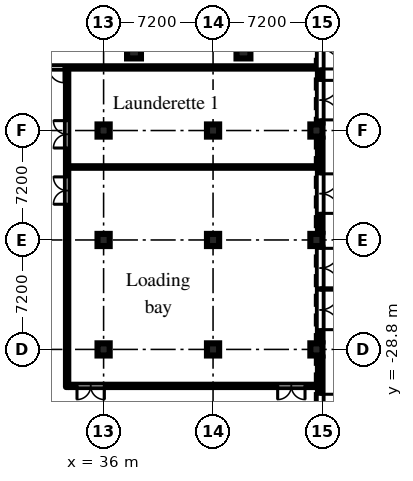
"""IFC4 building model, lengths in metres.
Left out: names, types, materials, properties, quantities, classifications, styles, units other than length and angle.
Written with IfcOpenShell. Run it as: python <this file> out.ifc"""

import sys

from ifc_helpers import new_model, si_unit, direction, frame, frame_2d, origin, origin_2d, place, context, subcontext, project, spatial, rectangle, hollow_circle, extrude, element, fill, save


model = new_model("IFC4")
c1 = context("Model", 3, precision=1e-05, world=origin(), true_north=direction((0.0, 1.0)))
c2 = subcontext(c1, "Body", "Model", "MODEL_VIEW")
j1 = project(units=[si_unit("LENGTHUNIT", "METRE"), si_unit("PLANEANGLEUNIT", "RADIAN")], contexts=[c1])
p1 = place(None, origin())
s1 = spatial("IfcSite", under=j1, at=p1, CompositionType="ELEMENT")
p2 = place(p1, origin())
s2 = spatial("IfcBuilding", under=s1, at=p2, CompositionType="ELEMENT")
p3 = place(p2, origin())
s3 = spatial("IfcBuildingStorey", under=s2, at=p3, CompositionType="ELEMENT", Elevation=0.0)
for number, where, z_axis, x_axis in (
    (1, (36.0, -28.8, 0.0), (0.0, 0.0, 1.0), (1.0, 0.0, 0.0)),
    (2, (36.0, -21.6, 0.0), (0.0, 0.0, 1.0), (1.0, 0.0, 0.0)),
    (3, (36.0, -14.4, 0.0), (0.0, 0.0, 1.0), (1.0, 0.0, 0.0)),
    (4, (43.2, -28.8, 0.0), (0.0, 0.0, 1.0), (1.0, 0.0, 0.0)),
    (5, (43.2, -21.6, 0.0), (0.0, 0.0, 1.0), (1.0, 0.0, 0.0)),
    (6, (43.2, -14.4, 0.0), (0.0, 0.0, 1.0), (1.0, 0.0, 0.0)),
    (7, (50.0, -28.8, 0.0), (0.0, 0.0, 1.0), (1.0, 0.0, 0.0)),
    (8, (50.0, -21.6, 0.0), (0.0, 0.0, 1.0), (1.0, 0.0, 0.0)),
    (9, (50.0, -14.4, 0.0), (0.0, 0.0, 1.0), (1.0, 0.0, 0.0)),
):
    element("IfcColumn", number, at=place(p3, frame(where, z_axis=z_axis, x_axis=x_axis)), inside=s3, PredefinedType="COLUMN", context=c2, shape_type="SweptSolid", body=[
        extrude(rectangle(XDim=0.8, YDim=0.8, at=origin_2d()), origin(), (0.0, 0.0, 1.0), 6.6),
    ])
for number, where, z_axis, x_axis in (
    (10, (38.0, -9.2, 0.0), (0.0, 0.0, 1.0), (1.0, 0.0, 0.0)),
    (11, (45.2, -9.2, 0.0), (0.0, 0.0, 1.0), (1.0, 0.0, 0.0)),
):
    element("IfcColumn", number, at=place(p3, frame(where, z_axis=z_axis, x_axis=x_axis)), inside=s3, PredefinedType="COLUMN", context=c2, shape_type="SweptSolid", body=[
        extrude(hollow_circle(Radius=0.457, WallThickness=0.05, at=origin_2d()), origin(), (0.0, 0.0, 1.0), 7.5),
    ])
p4 = place(p3, frame((50.25, -35.6, 0.0), z_axis=(0.0, 0.0, 1.0), x_axis=(0.0, 1.0, 0.0)))
e12 = element("IfcWall", 12, at=p4, inside=s3, PredefinedType="SOLIDWALL", context=c2, shape_type="SweptSolid", body=[
    extrude(rectangle(XDim=6.4, YDim=0.3, at=frame_2d((3.2, 0.0))), origin(), (0.0, 0.0, 1.0), 6.6),
])
p5 = place(p4, frame((2.55, 0.0, 0.0)))
e13 = element("IfcOpeningElement", 13, at=p5, cuts=e12, PredefinedType="OPENING", context=c2, shape_type="SweptSolid", body=[
    extrude(rectangle(XDim=1.3, YDim=2.1, at=frame_2d((0.65, 1.05))), frame((0.0, 0.16, 0.0), z_axis=(0.0, -1.0, 0.0), x_axis=(1.0, 0.0, 0.0)), (0.0, 0.0, 1.0), 0.32),
])
p6 = place(p3, frame((50.25, -28.4, 0.0), z_axis=(0.0, 0.0, 1.0), x_axis=(0.0, 1.0, 0.0)))
e14 = element("IfcWall", 14, at=p6, inside=s3, PredefinedType="SOLIDWALL", context=c2, shape_type="SweptSolid", body=[
    extrude(rectangle(XDim=6.4, YDim=0.3, at=frame_2d((3.2, 0.0))), origin(), (0.0, 0.0, 1.0), 6.6),
])
p7 = place(p6, frame((0.9, 0.0, 0.0)))
e15 = element("IfcOpeningElement", 15, at=p7, cuts=e14, PredefinedType="OPENING", context=c2, shape_type="SweptSolid", body=[
    extrude(rectangle(XDim=2.6, YDim=2.4, at=frame_2d((1.3, 1.2))), frame((0.0, 0.16, 0.0), z_axis=(0.0, -1.0, 0.0), x_axis=(1.0, 0.0, 0.0)), (0.0, 0.0, 1.0), 0.32),
])
p8 = place(p6, frame((3.65, 0.0, 0.0)))
e16 = element("IfcOpeningElement", 16, at=p8, cuts=e14, PredefinedType="OPENING", context=c2, shape_type="SweptSolid", body=[
    extrude(rectangle(XDim=2.6, YDim=2.4, at=frame_2d((1.3, 1.2))), frame((0.0, 0.16, 0.0), z_axis=(0.0, -1.0, 0.0), x_axis=(1.0, 0.0, 0.0)), (0.0, 0.0, 1.0), 0.32),
])
p9 = place(p3, frame((50.25, -21.2, 0.0), z_axis=(0.0, 0.0, 1.0), x_axis=(0.0, 1.0, 0.0)))
e17 = element("IfcWall", 17, at=p9, inside=s3, PredefinedType="SOLIDWALL", context=c2, shape_type="SweptSolid", body=[
    extrude(rectangle(XDim=6.4, YDim=0.3, at=frame_2d((3.2, 0.0))), origin(), (0.0, 0.0, 1.0), 6.6),
])
p10 = place(p9, frame((1.35, 0.0, 0.0)))
e18 = element("IfcOpeningElement", 18, at=p10, cuts=e17, PredefinedType="OPENING", context=c2, shape_type="SweptSolid", body=[
    extrude(rectangle(XDim=2.6, YDim=2.4, at=frame_2d((1.3, 1.2))), frame((0.0, 0.16, 0.0), z_axis=(0.0, -1.0, 0.0), x_axis=(1.0, 0.0, 0.0)), (0.0, 0.0, 1.0), 0.32),
])
p11 = place(p3, frame((50.25, -14.0, 0.0), z_axis=(0.0, 0.0, 1.0), x_axis=(0.0, 1.0, 0.0)))
e19 = element("IfcWall", 19, at=p11, inside=s3, PredefinedType="SOLIDWALL", context=c2, shape_type="SweptSolid", body=[
    extrude(rectangle(XDim=6.4, YDim=0.3, at=frame_2d((3.2, 0.0))), origin(), (0.0, 0.0, 1.0), 6.6),
])
p12 = place(p11, frame((0.3, 0.0, 0.0)))
e20 = element("IfcOpeningElement", 20, at=p12, cuts=e19, PredefinedType="OPENING", context=c2, shape_type="SweptSolid", body=[
    extrude(rectangle(XDim=2.6, YDim=2.4, at=frame_2d((1.3, 1.2))), frame((0.0, 0.16, 0.0), z_axis=(0.0, -1.0, 0.0), x_axis=(1.0, 0.0, 0.0)), (0.0, 0.0, 1.0), 0.32),
])
p13 = place(p11, frame((3.65, 0.0, 0.0)))
e21 = element("IfcOpeningElement", 21, at=p13, cuts=e19, PredefinedType="OPENING", context=c2, shape_type="SweptSolid", body=[
    extrude(rectangle(XDim=2.6, YDim=2.4, at=frame_2d((1.3, 1.2))), frame((0.0, 0.16, 0.0), z_axis=(0.0, -1.0, 0.0), x_axis=(1.0, 0.0, 0.0)), (0.0, 0.0, 1.0), 0.32),
])
p14 = place(p3, frame((12.675, -10.25, 0.0), z_axis=(0.0, 0.0, 1.0), x_axis=(1.0, 0.0, 0.0)))
e22 = element("IfcWall", 22, at=p14, inside=s3, PredefinedType="PARTITIONING", context=c2, shape_type="SweptSolid", body=[
    extrude(rectangle(XDim=37.545, YDim=0.15, at=frame_2d((18.772, 0.0))), origin(), (0.0, 0.0, 1.0), 6.6),
])
p15 = place(p14, frame((4.225, 0.0, 0.0)))
e23 = element("IfcOpeningElement", 23, at=p15, cuts=e22, PredefinedType="OPENING", context=c2, shape_type="SweptSolid", body=[
    extrude(rectangle(XDim=1.2, YDim=2.1, at=frame_2d((0.6, 1.05))), frame((0.0, 0.085, 0.0), z_axis=(0.0, -1.0, 0.0), x_axis=(1.0, 0.0, 0.0)), (0.0, 0.0, 1.0), 0.17),
])
p16 = place(p14, frame((18.725, 0.0, 0.0)))
e24 = element("IfcOpeningElement", 24, at=p16, cuts=e22, PredefinedType="OPENING", context=c2, shape_type="SweptSolid", body=[
    extrude(rectangle(XDim=2.0, YDim=2.1, at=frame_2d((1.0, 1.05))), frame((0.0, 0.085, 0.0), z_axis=(0.0, -1.0, 0.0), x_axis=(1.0, 0.0, 0.0)), (0.0, 0.0, 1.0), 0.17),
])
p17 = place(p3, frame((33.6, -31.275, 0.0), z_axis=(0.0, 0.0, 1.0), x_axis=(0.0, 1.0, 0.0)))
e25 = element("IfcWall", 25, at=p17, inside=s3, PredefinedType="PARTITIONING", context=c2, shape_type="SweptSolid", body=[
    extrude(rectangle(XDim=20.95, YDim=0.15, at=frame_2d((10.475, 0.0))), origin(), (0.0, 0.0, 1.0), 6.6),
])
p18 = place(p17, frame((15.725, 0.0, 0.0)))
e26 = element("IfcOpeningElement", 26, at=p18, cuts=e25, PredefinedType="OPENING", context=c2, shape_type="SweptSolid", body=[
    extrude(rectangle(XDim=1.8, YDim=2.1, at=frame_2d((0.9, 1.05))), frame((0.0, 0.085, 0.0), z_axis=(0.0, -1.0, 0.0), x_axis=(1.0, 0.0, 0.0)), (0.0, 0.0, 1.0), 0.17),
])
p19 = place(p17, frame((12.025, 0.0, 0.0)))
e27 = element("IfcOpeningElement", 27, at=p19, cuts=e25, PredefinedType="OPENING", context=c2, shape_type="SweptSolid", body=[
    extrude(rectangle(XDim=1.8, YDim=2.1, at=frame_2d((0.9, 1.05))), frame((0.0, 0.085, 0.0), z_axis=(0.0, -1.0, 0.0), x_axis=(1.0, 0.0, 0.0)), (0.0, 0.0, 1.0), 0.17),
])
p20 = place(p3, frame((33.675, -31.2, 0.0), z_axis=(0.0, 0.0, 1.0), x_axis=(1.0, 0.0, 0.0)))
e28 = element("IfcWall", 28, at=p20, inside=s3, PredefinedType="PARTITIONING", context=c2, shape_type="SweptSolid", body=[
    extrude(rectangle(XDim=16.545, YDim=0.15, at=frame_2d((8.272, 0.0))), origin(), (0.0, 0.0, 1.0), 6.6),
])
p21 = place(p20, frame((0.575, 0.0, 0.0)))
e29 = element("IfcOpeningElement", 29, at=p21, cuts=e28, PredefinedType="OPENING", context=c2, shape_type="SweptSolid", body=[
    extrude(rectangle(XDim=1.8, YDim=2.1, at=frame_2d((0.9, 1.05))), frame((0.0, 0.085, 0.0), z_axis=(0.0, -1.0, 0.0), x_axis=(1.0, 0.0, 0.0)), (0.0, 0.0, 1.0), 0.17),
])
p22 = place(p20, frame((13.775, 0.0, 0.0)))
e30 = element("IfcOpeningElement", 30, at=p22, cuts=e28, PredefinedType="OPENING", context=c2, shape_type="SweptSolid", body=[
    extrude(rectangle(XDim=1.8, YDim=2.1, at=frame_2d((0.9, 1.05))), frame((0.0, 0.085, 0.0), z_axis=(0.0, -1.0, 0.0), x_axis=(1.0, 0.0, 0.0)), (0.0, 0.0, 1.0), 0.17),
])
p23 = place(p3, frame((33.675, -16.8, 0.0), z_axis=(0.0, 0.0, 1.0), x_axis=(1.0, 0.0, 0.0)))
e31 = element("IfcWall", 31, at=p23, inside=s3, PredefinedType="PARTITIONING", context=c2, shape_type="SweptSolid", body=[
    extrude(rectangle(XDim=16.545, YDim=0.1, at=frame_2d((8.272, 0.0))), origin(), (0.0, 0.0, 1.0), 6.6),
])
p24 = place(p5, frame((1.3, 0.0, 0.0), z_axis=(0.0, 0.0, 1.0), x_axis=(-1.0, 0.0, 0.0)))
e32 = element("IfcDoor", 32, at=p24, inside=s3, OperationType="SINGLE_SWING_LEFT", PredefinedType="DOOR", context=c2, shape_type="SweptSolid", body=[
    extrude(rectangle(XDim=1.3, YDim=2.1, at=frame_2d((0.65, 1.05))), frame((0.0, 0.025, 0.0), z_axis=(0.0, -1.0, 0.0), x_axis=(1.0, 0.0, 0.0)), (0.0, 0.0, 1.0), 0.05),
])
fill(e13, e32)
p25 = place(p7, frame((2.6, 0.0, 0.0), z_axis=(0.0, 0.0, 1.0), x_axis=(-1.0, 0.0, 0.0)))
e33 = element("IfcDoor", 33, at=p25, inside=s3, OperationType="DOUBLE_DOOR_DOUBLE_SWING", PredefinedType="DOOR", context=c2, shape_type="SweptSolid", body=[
    extrude(rectangle(XDim=2.6, YDim=2.4, at=frame_2d((1.3, 1.2))), frame((0.0, 0.025, 0.0), z_axis=(0.0, -1.0, 0.0), x_axis=(1.0, 0.0, 0.0)), (0.0, 0.0, 1.0), 0.05),
])
fill(e15, e33)
p26 = place(p8, frame((2.6, 0.0, 0.0), z_axis=(0.0, 0.0, 1.0), x_axis=(-1.0, 0.0, 0.0)))
e34 = element("IfcDoor", 34, at=p26, inside=s3, OperationType="DOUBLE_DOOR_DOUBLE_SWING", PredefinedType="DOOR", context=c2, shape_type="SweptSolid", body=[
    extrude(rectangle(XDim=2.6, YDim=2.4, at=frame_2d((1.3, 1.2))), frame((0.0, 0.025, 0.0), z_axis=(0.0, -1.0, 0.0), x_axis=(1.0, 0.0, 0.0)), (0.0, 0.0, 1.0), 0.05),
])
fill(e16, e34)
p27 = place(p10, frame((2.6, 0.0, 0.0), z_axis=(0.0, 0.0, 1.0), x_axis=(-1.0, 0.0, 0.0)))
e35 = element("IfcDoor", 35, at=p27, inside=s3, OperationType="DOUBLE_DOOR_DOUBLE_SWING", PredefinedType="DOOR", context=c2, shape_type="SweptSolid", body=[
    extrude(rectangle(XDim=2.6, YDim=2.4, at=frame_2d((1.3, 1.2))), frame((0.0, 0.025, 0.0), z_axis=(0.0, -1.0, 0.0), x_axis=(1.0, 0.0, 0.0)), (0.0, 0.0, 1.0), 0.05),
])
fill(e18, e35)
p28 = place(p12, frame((2.6, 0.0, 0.0), z_axis=(0.0, 0.0, 1.0), x_axis=(-1.0, 0.0, 0.0)))
e36 = element("IfcDoor", 36, at=p28, inside=s3, OperationType="DOUBLE_DOOR_DOUBLE_SWING", PredefinedType="DOOR", context=c2, shape_type="SweptSolid", body=[
    extrude(rectangle(XDim=2.6, YDim=2.4, at=frame_2d((1.3, 1.2))), frame((0.0, 0.025, 0.0), z_axis=(0.0, -1.0, 0.0), x_axis=(1.0, 0.0, 0.0)), (0.0, 0.0, 1.0), 0.05),
])
fill(e20, e36)
p29 = place(p13, frame((2.6, 0.0, 0.0), z_axis=(0.0, 0.0, 1.0), x_axis=(-1.0, 0.0, 0.0)))
e37 = element("IfcDoor", 37, at=p29, inside=s3, OperationType="DOUBLE_DOOR_DOUBLE_SWING", PredefinedType="DOOR", context=c2, shape_type="SweptSolid", body=[
    extrude(rectangle(XDim=2.6, YDim=2.4, at=frame_2d((1.3, 1.2))), frame((0.0, 0.025, 0.0), z_axis=(0.0, -1.0, 0.0), x_axis=(1.0, 0.0, 0.0)), (0.0, 0.0, 1.0), 0.05),
])
fill(e21, e37)
p30 = place(p16, frame((2.0, 0.0, 0.0), z_axis=(0.0, 0.0, 1.0), x_axis=(-1.0, 0.0, 0.0)))
e38 = element("IfcDoor", 38, at=p30, inside=s3, OperationType="DOUBLE_DOOR_DOUBLE_SWING", PredefinedType="DOOR", context=c2, shape_type="SweptSolid", body=[
    extrude(rectangle(XDim=2.0, YDim=2.1, at=frame_2d((1.0, 1.05))), frame((0.0, 0.025, 0.0), z_axis=(0.0, -1.0, 0.0), x_axis=(1.0, 0.0, 0.0)), (0.0, 0.0, 1.0), 0.05),
])
fill(e24, e38)
p31 = place(p18, origin())
e39 = element("IfcDoor", 39, at=p31, inside=s3, OperationType="DOUBLE_DOOR_DOUBLE_SWING", PredefinedType="DOOR", context=c2, shape_type="SweptSolid", body=[
    extrude(rectangle(XDim=1.8, YDim=2.1, at=frame_2d((0.9, 1.05))), frame((0.0, 0.025, 0.0), z_axis=(0.0, -1.0, 0.0), x_axis=(1.0, 0.0, 0.0)), (0.0, 0.0, 1.0), 0.05),
])
fill(e26, e39)
p32 = place(p19, origin())
e40 = element("IfcDoor", 40, at=p32, inside=s3, OperationType="DOUBLE_DOOR_DOUBLE_SWING", PredefinedType="DOOR", context=c2, shape_type="SweptSolid", body=[
    extrude(rectangle(XDim=1.8, YDim=2.1, at=frame_2d((0.9, 1.05))), frame((0.0, 0.025, 0.0), z_axis=(0.0, -1.0, 0.0), x_axis=(1.0, 0.0, 0.0)), (0.0, 0.0, 1.0), 0.05),
])
fill(e27, e40)
p33 = place(p21, frame((1.8, 0.0, 0.0), z_axis=(0.0, 0.0, 1.0), x_axis=(-1.0, 0.0, 0.0)))
e41 = element("IfcDoor", 41, at=p33, inside=s3, OperationType="DOUBLE_DOOR_DOUBLE_SWING", PredefinedType="DOOR", context=c2, shape_type="SweptSolid", body=[
    extrude(rectangle(XDim=1.8, YDim=2.1, at=frame_2d((0.9, 1.05))), frame((0.0, 0.025, 0.0), z_axis=(0.0, -1.0, 0.0), x_axis=(1.0, 0.0, 0.0)), (0.0, 0.0, 1.0), 0.05),
])
fill(e29, e41)
p34 = place(p22, frame((1.8, 0.0, 0.0), z_axis=(0.0, 0.0, 1.0), x_axis=(-1.0, 0.0, 0.0)))
e42 = element("IfcDoor", 42, at=p34, inside=s3, OperationType="DOUBLE_DOOR_DOUBLE_SWING", PredefinedType="DOOR", context=c2, shape_type="SweptSolid", body=[
    extrude(rectangle(XDim=1.8, YDim=2.1, at=frame_2d((0.9, 1.05))), frame((0.0, 0.025, 0.0), z_axis=(0.0, -1.0, 0.0), x_axis=(1.0, 0.0, 0.0)), (0.0, 0.0, 1.0), 0.05),
])
fill(e30, e42)
save(model, sys.argv[1])
